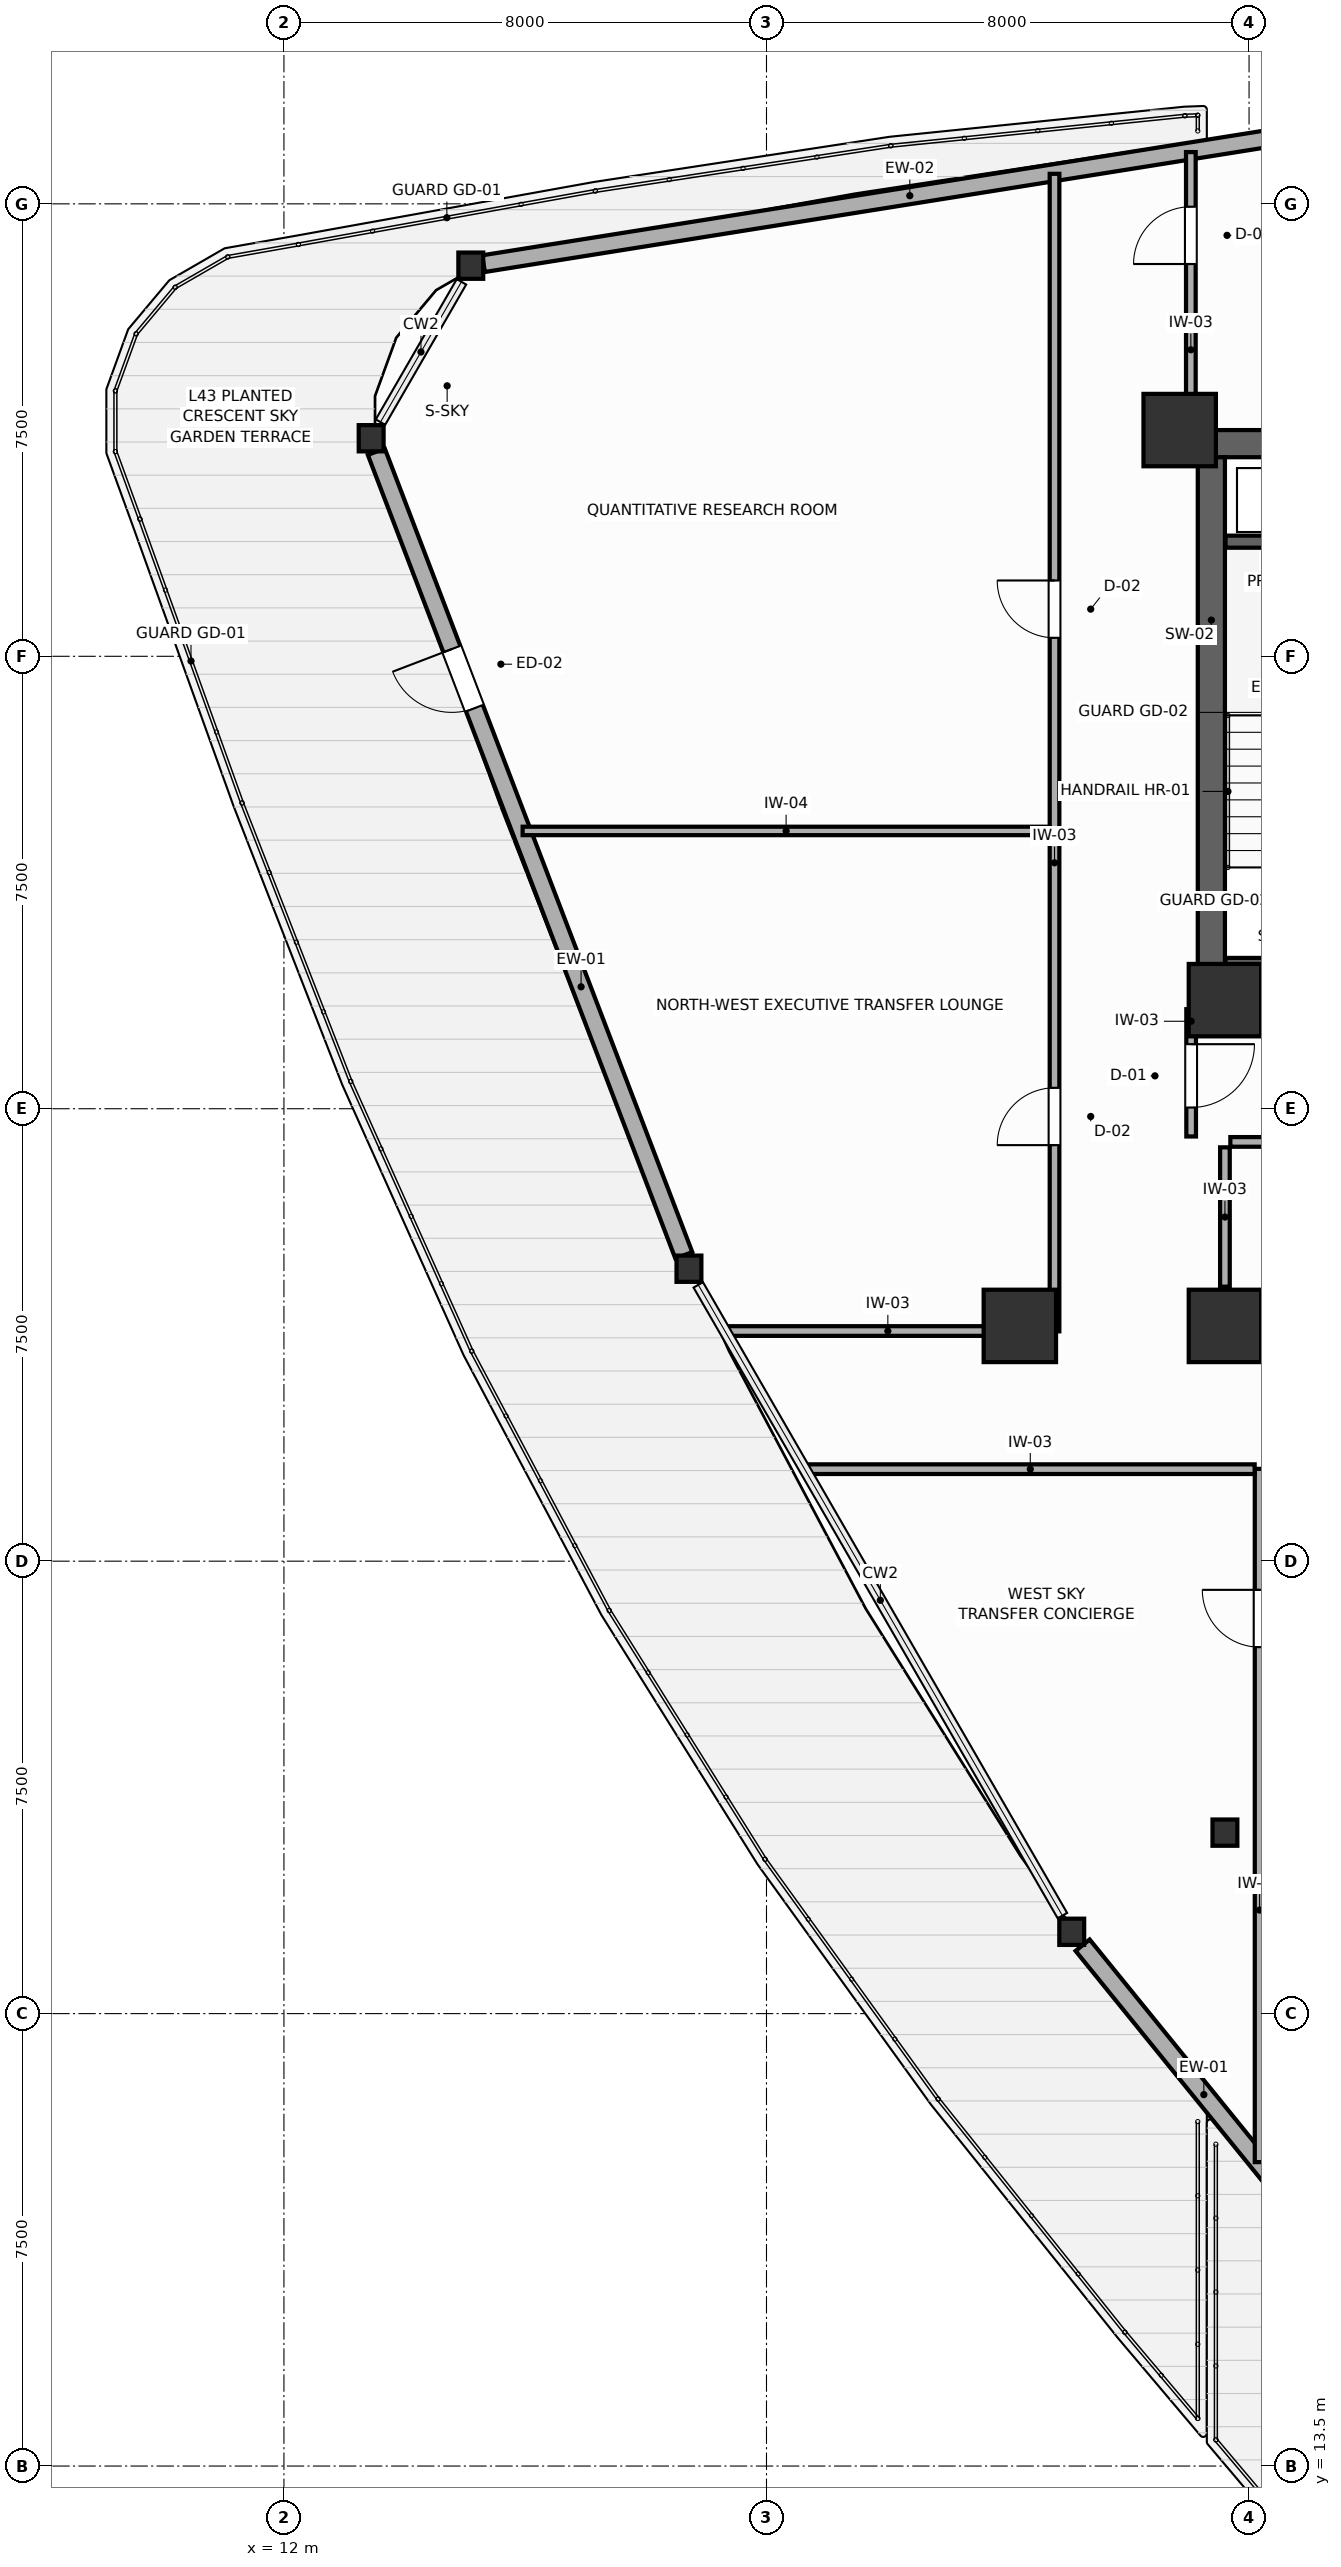
"""IFC4 building model, lengths in metres.
Left out: names, types, materials, properties, quantities, classifications, styles, units other than length and angle.
Written with IfcOpenShell. Run it as: python <this file> out.ifc"""

import sys

from ifc_helpers import new_model, si_unit, direction, frame, frame_2d, origin, origin_2d, place, context, subcontext, project, spatial, rectangle, i_section, extrude, source, transform, mapped, element, fill, save


model = new_model("IFC4")
c1 = context("Model", 3, precision=1e-05, world=origin(), true_north=direction((0.0, 1.0)))
c2 = subcontext(c1, "Body", "Model", "MODEL_VIEW")
j1 = project(units=[si_unit("LENGTHUNIT", "METRE"), si_unit("PLANEANGLEUNIT", "RADIAN")], contexts=[c1])
p1 = place(None, origin())
s1 = spatial("IfcSite", under=j1, at=p1, CompositionType="ELEMENT")
p2 = place(p1, origin())
s2 = spatial("IfcBuilding", under=s1, at=p2, CompositionType="ELEMENT")
p3 = place(p2, frame((0.0, 0.0, 168.6)))
s3 = spatial("IfcBuildingStorey", under=s2, at=p3, CompositionType="ELEMENT", Elevation=168.6)
p4 = place(p3, frame((27.15, 47.025, 0.0), z_axis=(0.0, 0.0, 1.0), x_axis=(1.0, 0.0, 0.0)))
e1 = element("IfcWall", 1, at=p4, inside=s3, PredefinedType="SHEAR", context=c2, shape_type="SweptSolid", body=[
    extrude(rectangle(XDim=17.7, YDim=0.45, at=frame_2d((8.85, 0.0))), origin(), (0.0, 0.0, 1.0), 3.6),
])
p5 = place(p3, frame((27.15, 37.575, 0.0), z_axis=(0.0, 0.0, 1.0), x_axis=(1.0, 0.0, 0.0)))
e2 = element("IfcWall", 2, at=p5, inside=s3, PredefinedType="SHEAR", context=c2, shape_type="SweptSolid", body=[
    extrude(rectangle(XDim=17.7, YDim=0.45, at=frame_2d((8.85, 0.0))), origin(), (0.0, 0.0, 1.0), 3.6),
])
p6 = place(p5, frame((4.875, 0.0, 0.0)))
e3 = element("IfcOpeningElement", 3, at=p6, cuts=e2, PredefinedType="OPENING", context=c2, shape_type="SweptSolid", body=[
    extrude(rectangle(XDim=1.05, YDim=2.1, at=frame_2d((0.525, 1.05))), frame((0.0, 0.235, 0.0), z_axis=(0.0, -1.0, 0.0), x_axis=(1.0, 0.0, 0.0)), (0.0, 0.0, 1.0), 0.47),
])
p7 = place(p5, frame((11.775, 0.0, 0.0)))
e4 = element("IfcOpeningElement", 4, at=p7, cuts=e2, PredefinedType="OPENING", context=c2, shape_type="SweptSolid", body=[
    extrude(rectangle(XDim=1.05, YDim=2.1, at=frame_2d((0.525, 1.05))), frame((0.0, 0.235, 0.0), z_axis=(0.0, -1.0, 0.0), x_axis=(1.0, 0.0, 0.0)), (0.0, 0.0, 1.0), 0.47),
])
p8 = place(p3, frame((27.375, 37.8, 0.0), z_axis=(0.0, 0.0, 1.0), x_axis=(0.0, 1.0, 0.0)))
e5 = element("IfcWall", 5, at=p8, inside=s3, PredefinedType="SHEAR", context=c2, shape_type="SweptSolid", body=[
    extrude(rectangle(XDim=9.0, YDim=0.45, at=frame_2d((4.5, 0.0))), origin(), (0.0, 0.0, 1.0), 3.6),
])
m1 = source(origin(), c2, "Body", "SweptSolid", [
    extrude(rectangle(XDim=1.2, YDim=1.2, at=origin_2d()), origin(), (0.0, 0.0, 1.0), 3.6),
])
for number, where, z_axis, x_axis in (
    (6, (26.85, 47.25, 0.0), (0.0, 0.0, 1.0), (1.0, 0.0, 0.0)),
    (7, (27.6, 37.8, 0.0), (0.0, 0.0, 1.0), (1.0, 0.0, 0.0)),
    (8, (27.6, 32.4, 0.0), (0.0, 0.0, 1.0), (1.0, 0.0, 0.0)),
    (9, (24.2, 32.4, 0.0), (0.0, 0.0, 1.0), (1.0, 0.0, 0.0)),
):
    element("IfcColumn", number, at=place(p3, frame(where, z_axis=z_axis, x_axis=x_axis)), inside=s3, PredefinedType="COLUMN", context=c2, shape_type="MappedRepresentation", body=[
        mapped(m1, transform((0.0, 0.0, 0.0), scale=1.0)),
    ])
m2 = source(origin(), c2, "Body", "SweptSolid", [
    extrude(i_section(OverallWidth=0.412, OverallDepth=0.435, WebThickness=0.033, FlangeThickness=0.053, FilletRadius=0.015, at=origin_2d()), origin(), (0.0, 0.0, 1.0), 3.6),
])
for number, where, z_axis, x_axis in (
    (10, (27.6, 24.0, 0.0), (0.0, 0.0, 1.0), (1.0, 0.0, 0.0)),
    (11, (15.098, 49.975, 0.0), (0.0, 0.0, 1.0), (1.0, 0.0, 0.0)),
    (12, (13.446, 47.115, 0.0), (0.0, 0.0, 1.0), (1.0, 0.0, 0.0)),
    (13, (18.714, 33.348, 0.0), (0.0, 0.0, 1.0), (1.0, 0.0, 0.0)),
    (14, (25.06, 22.356, 0.0), (0.0, 0.0, 1.0), (1.0, 0.0, 0.0)),
):
    element("IfcColumn", number, at=place(p3, frame(where, z_axis=z_axis, x_axis=x_axis)), inside=s3, PredefinedType="COLUMN", context=c2, shape_type="MappedRepresentation", body=[
        mapped(m2, transform((0.0, 0.0, 0.0), scale=1.0)),
    ])
p9 = place(p3, frame((29.443, 52.262, 0.0), z_axis=(0.0, 0.0, 1.0), x_axis=(-0.987526171813, -0.157454945885, 0.0)))
e15 = element("IfcWall", 15, at=p9, inside=s3, PredefinedType="SOLIDWALL", context=c2, shape_type="SweptSolid", body=[
    extrude(rectangle(XDim=14.313, YDim=0.28, at=frame_2d((7.156, 0.0))), origin(), (0.0, 0.0, 1.0), 2.95),
])
p10 = place(p3, frame((13.531, 46.892, 0.0), z_axis=(0.0, 0.0, 1.0), x_axis=(0.357419860287, -0.933943811732, 0.0)))
e16 = element("IfcWall", 16, at=p10, inside=s3, PredefinedType="SOLIDWALL", context=c2, shape_type="SweptSolid", body=[
    extrude(rectangle(XDim=14.264, YDim=0.3, at=frame_2d((7.132, 0.0))), origin(), (0.0, 0.0, 1.0), 2.95),
])
p11 = place(p10, frame((3.503, 0.0, 0.0)))
e17 = element("IfcOpeningElement", 17, at=p11, cuts=e16, PredefinedType="OPENING", context=c2, shape_type="SweptSolid", body=[
    extrude(rectangle(XDim=1.05, YDim=2.1, at=frame_2d((0.525, 1.05))), frame((0.0, 0.16, 0.0), z_axis=(0.0, -1.0, 0.0), x_axis=(1.0, 0.0, 0.0)), (0.0, 0.0, 1.0), 0.32),
])
p12 = place(p3, frame((25.241, 22.134, 0.0), z_axis=(0.0, 0.0, 1.0), x_axis=(0.630110463711, -0.776505507722, 0.0)))
e18 = element("IfcWall", 18, at=p12, inside=s3, PredefinedType="SOLIDWALL", context=c2, shape_type="SweptSolid", body=[
    extrude(rectangle(XDim=14.167, YDim=0.3, at=frame_2d((7.083, 0.0))), origin(), (0.0, 0.0, 1.0), 3.0),
])
p13 = place(p12, frame((6.559, 0.0, 0.0)))
e19 = element("IfcOpeningElement", 19, at=p13, cuts=e18, PredefinedType="OPENING", context=c2, shape_type="SweptSolid", body=[
    extrude(rectangle(XDim=1.05, YDim=2.1, at=frame_2d((0.525, 1.05))), frame((0.0, 0.16, 0.0), z_axis=(0.0, -1.0, 0.0), x_axis=(1.0, 0.0, 0.0)), (0.0, 0.0, 1.0), 0.32),
])
for number, where, z_axis, x_axis in (
    (20, (27.61, 45.4, 0.0), (0.0, 0.0, 1.0), (1.0, 0.0, 0.0)),
    (21, (27.61, 38.4, 0.0), (0.0, 0.0, 1.0), (1.0, 0.0, 0.0)),
):
    element("IfcWall", number, at=place(p3, frame(where, z_axis=z_axis, x_axis=x_axis)), inside=s3, PredefinedType="SHEAR", context=c2, shape_type="SweptSolid", body=[
        extrude(rectangle(XDim=3.14, YDim=0.2, at=frame_2d((1.57, 0.0))), origin(), (0.0, 0.0, 1.0), 3.6),
    ])
p14 = place(p3, frame((27.6, 33.05, 0.0), z_axis=(0.0, 0.0, 1.0), x_axis=(0.0, 1.0, 0.0)))
e22 = element("IfcWall", 22, at=p14, inside=s3, PredefinedType="PARTITIONING", context=c2, shape_type="SweptSolid", body=[
    extrude(rectangle(XDim=2.31, YDim=0.16, at=frame_2d((1.155, 0.0))), origin(), (0.0, 0.0, 1.0), 3.4),
])
p15 = place(p3, frame((27.69, 35.45, 0.0), z_axis=(0.0, 0.0, 1.0), x_axis=(1.0, 0.0, 0.0)))
e23 = element("IfcWall", 23, at=p15, inside=s3, PredefinedType="PARTITIONING", context=c2, shape_type="SweptSolid", body=[
    extrude(rectangle(XDim=4.01, YDim=0.16, at=frame_2d((2.005, 0.0))), origin(), (0.0, 0.0, 1.0), 3.4),
])
p16 = place(p15, frame((1.45, 0.0, 0.0)))
e24 = element("IfcOpeningElement", 24, at=p16, cuts=e23, PredefinedType="OPENING", context=c2, shape_type="SweptSolid", body=[
    extrude(rectangle(XDim=0.95, YDim=2.05, at=frame_2d((0.475, 1.025))), frame((0.0, 0.09, 0.0), z_axis=(0.0, -1.0, 0.0), x_axis=(1.0, 0.0, 0.0)), (0.0, 0.0, 1.0), 0.18),
])
p17 = place(p3, frame((27.04, 35.54, 0.0), z_axis=(0.0, 0.0, 1.0), x_axis=(0.0, 1.0, 0.0)))
e25 = element("IfcWall", 25, at=p17, inside=s3, PredefinedType="PARTITIONING", context=c2, shape_type="SweptSolid", body=[
    extrude(rectangle(XDim=2.11, YDim=0.16, at=frame_2d((1.055, 0.0))), origin(), (0.0, 0.0, 1.0), 3.4),
])
p18 = place(p17, frame((0.48, 0.0, 0.0)))
e26 = element("IfcOpeningElement", 26, at=p18, cuts=e25, PredefinedType="OPENING", context=c2, shape_type="SweptSolid", body=[
    extrude(rectangle(XDim=1.05, YDim=2.1, at=frame_2d((0.525, 1.05))), frame((0.0, 0.09, 0.0), z_axis=(0.0, -1.0, 0.0), x_axis=(1.0, 0.0, 0.0)), (0.0, 0.0, 1.0), 0.18),
])
p19 = place(p3, frame((24.775, 32.31, 0.0), z_axis=(0.0, 0.0, 1.0), x_axis=(0.0, 1.0, 0.0)))
e27 = element("IfcWall", 27, at=p19, inside=s3, PredefinedType="PARTITIONING", context=c2, shape_type="SweptSolid", body=[
    extrude(rectangle(XDim=19.188, YDim=0.16, at=frame_2d((9.594, 0.0))), origin(), (0.0, 0.0, 1.0), 3.4),
])
p20 = place(p19, frame((3.087, 0.0, 0.0)))
e28 = element("IfcOpeningElement", 28, at=p20, cuts=e27, PredefinedType="OPENING", context=c2, shape_type="SweptSolid", body=[
    extrude(rectangle(XDim=0.95, YDim=2.05, at=frame_2d((0.475, 1.025))), frame((0.0, 0.09, 0.0), z_axis=(0.0, -1.0, 0.0), x_axis=(1.0, 0.0, 0.0)), (0.0, 0.0, 1.0), 0.18),
])
p21 = place(p19, frame((11.497, 0.0, 0.0)))
e29 = element("IfcOpeningElement", 29, at=p21, cuts=e27, PredefinedType="OPENING", context=c2, shape_type="SweptSolid", body=[
    extrude(rectangle(XDim=0.95, YDim=2.05, at=frame_2d((0.475, 1.025))), frame((0.0, 0.09, 0.0), z_axis=(0.0, -1.0, 0.0), x_axis=(1.0, 0.0, 0.0)), (0.0, 0.0, 1.0), 0.18),
])
p22 = place(p3, frame((28.175, 18.538, 0.0), z_axis=(0.0, 0.0, 1.0), x_axis=(0.0, 1.0, 0.0)))
e30 = element("IfcWall", 30, at=p22, inside=s3, PredefinedType="PARTITIONING", context=c2, shape_type="SweptSolid", body=[
    extrude(rectangle(XDim=11.492, YDim=0.16, at=frame_2d((5.746, 0.0))), origin(), (0.0, 0.0, 1.0), 3.4),
])
p23 = place(p22, frame((8.537, 0.0, 0.0)))
e31 = element("IfcOpeningElement", 31, at=p23, cuts=e30, PredefinedType="OPENING", context=c2, shape_type="SweptSolid", body=[
    extrude(rectangle(XDim=0.95, YDim=2.05, at=frame_2d((0.475, 1.025))), frame((0.0, 0.09, 0.0), z_axis=(0.0, -1.0, 0.0), x_axis=(1.0, 0.0, 0.0)), (0.0, 0.0, 1.0), 0.18),
])
p24 = place(p3, frame((20.653, 30.025, 0.0), z_axis=(0.0, 0.0, 1.0), x_axis=(1.0, 0.0, 0.0)))
e32 = element("IfcWall", 32, at=p24, inside=s3, PredefinedType="PARTITIONING", context=c2, shape_type="SweptSolid", body=[
    extrude(rectangle(XDim=7.44, YDim=0.16, at=frame_2d((3.72, 0.0))), origin(), (0.0, 0.0, 1.0), 3.4),
])
p25 = place(p3, frame((19.331, 32.315, 0.0), z_axis=(0.0, 0.0, 1.0), x_axis=(1.0, 0.0, 0.0)))
e33 = element("IfcWall", 33, at=p25, inside=s3, PredefinedType="PARTITIONING", context=c2, shape_type="SweptSolid", body=[
    extrude(rectangle(XDim=5.362, YDim=0.16, at=frame_2d((2.681, 0.0))), origin(), (0.0, 0.0, 1.0), 2.95),
])
p26 = place(p3, frame((27.035, 47.34, 0.0), z_axis=(0.0, 0.0, 1.0), x_axis=(0.0, 1.0, 0.0)))
e34 = element("IfcWall", 34, at=p26, inside=s3, PredefinedType="PARTITIONING", context=c2, shape_type="SweptSolid", body=[
    extrude(rectangle(XDim=4.518, YDim=0.16, at=frame_2d((2.259, 0.0))), origin(), (0.0, 0.0, 1.0), 3.4),
])
p27 = place(p26, frame((2.663, 0.0, 0.0)))
e35 = element("IfcOpeningElement", 35, at=p27, cuts=e34, PredefinedType="OPENING", context=c2, shape_type="SweptSolid", body=[
    extrude(rectangle(XDim=0.95, YDim=2.05, at=frame_2d((0.475, 1.025))), frame((0.0, 0.09, 0.0), z_axis=(0.0, -1.0, 0.0), x_axis=(1.0, 0.0, 0.0)), (0.0, 0.0, 1.0), 0.18),
])
p28 = place(p3, frame((15.957, 40.605, 0.0), z_axis=(0.0, 0.0, 1.0), x_axis=(1.0, 0.0, 0.0)))
e36 = element("IfcWall", 36, at=p28, inside=s3, PredefinedType="PARTITIONING", context=c2, shape_type="SweptSolid", body=[
    extrude(rectangle(XDim=8.736, YDim=0.14, at=frame_2d((4.368, 0.0))), origin(), (0.0, 0.0, 1.0), 3.4),
])
p29 = place(p11, frame((1.05, 0.0, 0.0), z_axis=(0.0, 0.0, 1.0), x_axis=(-1.0, 0.0, 0.0)))
e37 = element("IfcDoor", 37, at=p29, inside=s3, OperationType="SINGLE_SWING_RIGHT", PredefinedType="DOOR", context=c2, shape_type="SweptSolid", body=[
    extrude(rectangle(XDim=1.05, YDim=2.1, at=frame_2d((0.525, 1.05))), frame((0.0, 0.025, 0.0), z_axis=(0.0, -1.0, 0.0), x_axis=(1.0, 0.0, 0.0)), (0.0, 0.0, 1.0), 0.05),
])
fill(e17, e37)
p30 = place(p18, frame((1.05, 0.0, 0.0), z_axis=(0.0, 0.0, 1.0), x_axis=(-1.0, 0.0, 0.0)))
e38 = element("IfcDoor", 38, at=p30, inside=s3, OperationType="SINGLE_SWING_LEFT", PredefinedType="DOOR", context=c2, shape_type="SweptSolid", body=[
    extrude(rectangle(XDim=1.05, YDim=2.1, at=frame_2d((0.525, 1.05))), frame((0.0, 0.025, 0.0), z_axis=(0.0, -1.0, 0.0), x_axis=(1.0, 0.0, 0.0)), (0.0, 0.0, 1.0), 0.05),
])
fill(e26, e38)
p31 = place(p20, origin())
e39 = element("IfcDoor", 39, at=p31, inside=s3, OperationType="SINGLE_SWING_LEFT", PredefinedType="DOOR", context=c2, shape_type="SweptSolid", body=[
    extrude(rectangle(XDim=0.95, YDim=2.05, at=frame_2d((0.475, 1.025))), frame((0.0, 0.025, 0.0), z_axis=(0.0, -1.0, 0.0), x_axis=(1.0, 0.0, 0.0)), (0.0, 0.0, 1.0), 0.05),
])
fill(e28, e39)
p32 = place(p21, origin())
e40 = element("IfcDoor", 40, at=p32, inside=s3, OperationType="SINGLE_SWING_RIGHT", PredefinedType="DOOR", context=c2, shape_type="SweptSolid", body=[
    extrude(rectangle(XDim=0.95, YDim=2.05, at=frame_2d((0.475, 1.025))), frame((0.0, 0.025, 0.0), z_axis=(0.0, -1.0, 0.0), x_axis=(1.0, 0.0, 0.0)), (0.0, 0.0, 1.0), 0.05),
])
fill(e29, e40)
p33 = place(p23, origin())
e41 = element("IfcDoor", 41, at=p33, inside=s3, OperationType="SINGLE_SWING_RIGHT", PredefinedType="DOOR", context=c2, shape_type="SweptSolid", body=[
    extrude(rectangle(XDim=0.95, YDim=2.05, at=frame_2d((0.475, 1.025))), frame((0.0, 0.025, 0.0), z_axis=(0.0, -1.0, 0.0), x_axis=(1.0, 0.0, 0.0)), (0.0, 0.0, 1.0), 0.05),
])
fill(e31, e41)
p34 = place(p27, origin())
e42 = element("IfcDoor", 42, at=p34, inside=s3, OperationType="SINGLE_SWING_LEFT", PredefinedType="DOOR", context=c2, shape_type="SweptSolid", body=[
    extrude(rectangle(XDim=0.95, YDim=2.05, at=frame_2d((0.475, 1.025))), frame((0.0, 0.025, 0.0), z_axis=(0.0, -1.0, 0.0), x_axis=(1.0, 0.0, 0.0)), (0.0, 0.0, 1.0), 0.05),
])
fill(e35, e42)
save(model, sys.argv[1])
